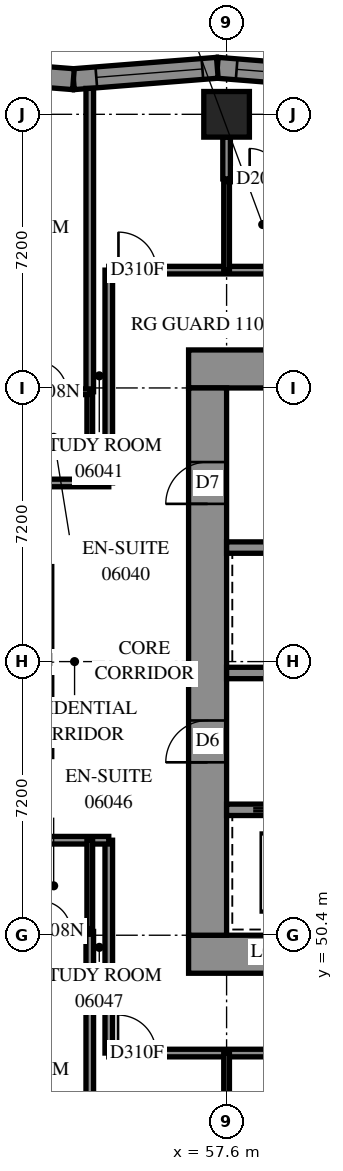
"""IFC4 building model, lengths in metres.
Left out: names, types, materials, properties, quantities, classifications, styles, units other than length and angle.
Written with IfcOpenShell. Run it as: python <this file> out.ifc"""

import sys

from ifc_helpers import new_model, si_unit, direction, frame, frame_2d, origin, origin_2d, place, context, subcontext, project, spatial, polyline, rectangle, outline, extrude, element, fill, save


model = new_model("IFC4")
c1 = context("Model", 3, precision=1e-05, world=origin(), true_north=direction((0.0, 1.0)))
c2 = subcontext(c1, "Body", "Model", "MODEL_VIEW")
j1 = project(units=[si_unit("LENGTHUNIT", "METRE"), si_unit("PLANEANGLEUNIT", "RADIAN")], contexts=[c1])
p1 = place(None, origin())
s1 = spatial("IfcSite", under=j1, at=p1, CompositionType="ELEMENT")
p2 = place(p1, origin())
s2 = spatial("IfcBuilding", under=s1, at=p2, CompositionType="ELEMENT")
p3 = place(p2, frame((0.0, 0.0, 27.0)))
s3 = spatial("IfcBuildingStorey", under=s2, at=p3, CompositionType="ELEMENT", Elevation=27.0)
p4 = place(p3, frame((57.6, 72.0, 0.0), z_axis=(0.0, 0.0, 1.0), x_axis=(1.0, 0.0, 0.0)))
e1 = element("IfcColumn", 1, at=p4, inside=s3, PredefinedType="COLUMN", context=c2, shape_type="SweptSolid", body=[
    extrude(rectangle(XDim=1.2, YDim=1.2, at=origin_2d()), origin(), (0.0, 0.0, 1.0), 3.1),
])
p5 = place(p3, frame((56.6, 49.9, -0.3), z_axis=(0.0, 0.0, 1.0), x_axis=(1.0, 0.0, 0.0)))
e2 = element("IfcWall", 2, at=p5, inside=s3, PredefinedType="SHEAR", context=c2, shape_type="SweptSolid", body=[
    extrude(rectangle(XDim=16.4, YDim=1.0, at=frame_2d((8.2, 0.0))), origin(), (0.0, 0.0, 1.0), 2.7),
])
p6 = place(p3, frame((56.6, 65.3, -0.3), z_axis=(0.0, 0.0, 1.0), x_axis=(1.0, 0.0, 0.0)))
e3 = element("IfcWall", 3, at=p6, inside=s3, PredefinedType="SHEAR", context=c2, shape_type="SweptSolid", body=[
    extrude(rectangle(XDim=16.4, YDim=1.0, at=frame_2d((8.2, 0.0))), origin(), (0.0, 0.0, 1.0), 2.7),
])
p7 = place(p6, frame((11.0, 0.0, 0.3)))
e4 = element("IfcOpeningElement", 4, at=p7, cuts=e3, PredefinedType="OPENING", context=c2, shape_type="SweptSolid", body=[
    extrude(rectangle(XDim=0.8, YDim=2.1, at=frame_2d((0.4, 1.05))), frame((0.0, 0.51, 0.0), z_axis=(0.0, -1.0, 0.0), x_axis=(1.0, 0.0, 0.0)), (0.0, 0.0, 1.0), 1.02),
])
p8 = place(p3, frame((57.1, 50.4, -0.3), z_axis=(0.0, 0.0, 1.0), x_axis=(0.0, 1.0, 0.0)))
e5 = element("IfcWall", 5, at=p8, inside=s3, PredefinedType="SHEAR", context=c2, shape_type="SweptSolid", body=[
    extrude(rectangle(XDim=14.4, YDim=1.0, at=frame_2d((7.2, 0.0))), origin(), (0.0, 0.0, 1.0), 2.7),
])
p9 = place(p8, frame((4.55, 0.0, 0.3)))
e6 = element("IfcOpeningElement", 6, at=p9, cuts=e5, PredefinedType="OPENING", context=c2, shape_type="SweptSolid", body=[
    extrude(rectangle(XDim=1.1, YDim=2.1, at=frame_2d((0.55, 1.05))), frame((0.0, 0.51, 0.0), z_axis=(0.0, -1.0, 0.0), x_axis=(1.0, 0.0, 0.0)), (0.0, 0.0, 1.0), 1.02),
])
p10 = place(p8, frame((11.35, 0.0, 0.3)))
e7 = element("IfcOpeningElement", 7, at=p10, cuts=e5, PredefinedType="OPENING", context=c2, shape_type="SweptSolid", body=[
    extrude(rectangle(XDim=1.1, YDim=2.1, at=frame_2d((0.55, 1.05))), frame((0.0, 0.51, 0.0), z_axis=(0.0, -1.0, 0.0), x_axis=(1.0, 0.0, 0.0)), (0.0, 0.0, 1.0), 1.02),
])
p11 = place(p3, frame((57.6, 53.7, 0.0), z_axis=(0.0, 0.0, 1.0), x_axis=(1.0, 0.0, 0.0)))
e8 = element("IfcWall", 8, at=p11, inside=s3, PredefinedType="SOLIDWALL", context=c2, shape_type="SweptSolid", body=[
    extrude(rectangle(XDim=14.4, YDim=0.3, at=frame_2d((7.2, 0.0))), origin(), (0.0, 0.0, 1.0), 3.1),
])
p12 = place(p11, frame((1.25, 0.0, 0.0)))
e9 = element("IfcOpeningElement", 9, at=p12, cuts=e8, PredefinedType="OPENING", context=c2, shape_type="SweptSolid", body=[
    extrude(rectangle(XDim=1.1, YDim=2.1, at=frame_2d((0.55, 1.05))), frame((0.0, 0.16, 0.0), z_axis=(0.0, -1.0, 0.0), x_axis=(1.0, 0.0, 0.0)), (0.0, 0.0, 1.0), 0.32),
])
p13 = place(p11, frame((4.85, 0.0, 0.0)))
e10 = element("IfcOpeningElement", 10, at=p13, cuts=e8, PredefinedType="OPENING", context=c2, shape_type="SweptSolid", body=[
    extrude(rectangle(XDim=1.1, YDim=2.1, at=frame_2d((0.55, 1.05))), frame((0.0, 0.16, 0.0), z_axis=(0.0, -1.0, 0.0), x_axis=(1.0, 0.0, 0.0)), (0.0, 0.0, 1.0), 0.32),
])
p14 = place(p11, frame((8.45, 0.0, 0.0)))
e11 = element("IfcOpeningElement", 11, at=p14, cuts=e8, PredefinedType="OPENING", context=c2, shape_type="SweptSolid", body=[
    extrude(rectangle(XDim=1.1, YDim=2.1, at=frame_2d((0.55, 1.05))), frame((0.0, 0.16, 0.0), z_axis=(0.0, -1.0, 0.0), x_axis=(1.0, 0.0, 0.0)), (0.0, 0.0, 1.0), 0.32),
])
p15 = place(p11, frame((12.05, 0.0, 0.0)))
e12 = element("IfcOpeningElement", 12, at=p15, cuts=e8, PredefinedType="OPENING", context=c2, shape_type="SweptSolid", body=[
    extrude(rectangle(XDim=1.1, YDim=2.1, at=frame_2d((0.55, 1.05))), frame((0.0, 0.16, 0.0), z_axis=(0.0, -1.0, 0.0), x_axis=(1.0, 0.0, 0.0)), (0.0, 0.0, 1.0), 0.32),
])
p16 = place(p3, frame((57.6, 57.3, 0.0), z_axis=(0.0, 0.0, 1.0), x_axis=(1.0, 0.0, 0.0)))
e13 = element("IfcWall", 13, at=p16, inside=s3, PredefinedType="SOLIDWALL", context=c2, shape_type="SweptSolid", body=[
    extrude(rectangle(XDim=14.4, YDim=0.3, at=frame_2d((7.2, 0.0))), origin(), (0.0, 0.0, 1.0), 3.1),
])
p17 = place(p16, frame((12.05, 0.0, 0.0)))
e14 = element("IfcOpeningElement", 14, at=p17, cuts=e13, PredefinedType="OPENING", context=c2, shape_type="SweptSolid", body=[
    extrude(rectangle(XDim=1.1, YDim=2.1, at=frame_2d((0.55, 1.05))), frame((0.0, 0.16, 0.0), z_axis=(0.0, -1.0, 0.0), x_axis=(1.0, 0.0, 0.0)), (0.0, 0.0, 1.0), 0.32),
])
p18 = place(p3, frame((57.6, 60.6, 0.0), z_axis=(0.0, 0.0, 1.0), x_axis=(1.0, 0.0, 0.0)))
e15 = element("IfcWall", 15, at=p18, inside=s3, PredefinedType="SOLIDWALL", context=c2, shape_type="SweptSolid", body=[
    extrude(rectangle(XDim=7.2, YDim=0.3, at=frame_2d((3.6, 0.0))), origin(), (0.0, 0.0, 1.0), 3.1),
])
p19 = place(p3, frame((61.142, 72.924, 0.0), z_axis=(0.0, 0.0, 1.0), x_axis=(-0.9968746163, 0.078999996, 0.0)))
e16 = element("IfcWall", 16, at=p19, inside=s3, PredefinedType="SOLIDWALL", context=c2, shape_type="SweptSolid", body=[
    extrude(outline(polyline([(0.022, -0.275), (3.819, -0.275), (3.776, 0.275), (-0.022, 0.275), (0.022, -0.275)])), origin(), (0.0, 0.0, 1.0), 3.1),
])
p20 = place(p19, frame((0.488, 0.0, 0.5)))
e17 = element("IfcOpeningElement", 17, at=p20, cuts=e16, PredefinedType="OPENING", context=c2, shape_type="SweptSolid", body=[
    extrude(rectangle(XDim=2.8, YDim=2.45, at=frame_2d((1.4, 1.225))), frame((0.0, 0.285, 0.0), z_axis=(0.0, -1.0, 0.0), x_axis=(1.0, 0.0, 0.0)), (0.0, 0.0, 1.0), 0.57),
])
p21 = place(p3, frame((57.356, 73.224, 0.0), z_axis=(0.0, 0.0, 1.0), x_axis=(-0.9968746163, -0.078999996, 0.0)))
e18 = element("IfcWall", 18, at=p21, inside=s3, PredefinedType="SOLIDWALL", context=c2, shape_type="SweptSolid", body=[
    extrude(outline(polyline([(-0.022, -0.275), (3.776, -0.275), (3.819, 0.275), (0.022, 0.275), (-0.022, -0.275)])), origin(), (0.0, 0.0, 1.0), 3.1),
])
p22 = place(p21, frame((0.394, 0.0, 0.5)))
e19 = element("IfcOpeningElement", 19, at=p22, cuts=e18, PredefinedType="OPENING", context=c2, shape_type="SweptSolid", body=[
    extrude(rectangle(XDim=2.8, YDim=2.45, at=frame_2d((1.4, 1.225))), frame((0.0, 0.285, 0.0), z_axis=(0.0, -1.0, 0.0), x_axis=(1.0, 0.0, 0.0)), (0.0, 0.0, 1.0), 0.57),
])
p23 = place(p3, frame((53.571, 72.924, 0.0), z_axis=(0.0, 0.0, 1.0), x_axis=(-0.9968747806, 0.0789979222, 0.0)))
e20 = element("IfcWall", 20, at=p23, inside=s3, PredefinedType="SOLIDWALL", context=c2, shape_type="SweptSolid", body=[
    extrude(outline(polyline([(0.022, -0.275), (3.819, -0.275), (3.776, 0.275), (-0.022, 0.275), (0.022, -0.275)])), origin(), (0.0, 0.0, 1.0), 3.1),
])
p24 = place(p23, frame((1.09, 0.0, 0.5)))
e21 = element("IfcOpeningElement", 21, at=p24, cuts=e20, PredefinedType="OPENING", context=c2, shape_type="SweptSolid", body=[
    extrude(rectangle(XDim=1.2, YDim=2.45, at=frame_2d((0.6, 1.225))), frame((0.0, 0.285, 0.0), z_axis=(0.0, -1.0, 0.0), x_axis=(1.0, 0.0, 0.0)), (0.0, 0.0, 1.0), 0.57),
])
p25 = place(p3, frame((33.502, 62.3, 0.0), z_axis=(0.0, 0.0, 1.0), x_axis=(1.0, 0.0, 0.0)))
e22 = element("IfcWall", 22, at=p25, inside=s3, PredefinedType="PARTITIONING", context=c2, shape_type="SweptSolid", body=[
    extrude(rectangle(XDim=20.998, YDim=0.2, at=frame_2d((10.499, 0.0))), origin(), (0.0, 0.0, 1.0), 3.1),
])
p26 = place(p25, frame((2.898, 0.0, 0.0)))
e23 = element("IfcOpeningElement", 23, at=p26, cuts=e22, PredefinedType="OPENING", context=c2, shape_type="SweptSolid", body=[
    extrude(rectangle(XDim=0.9, YDim=2.1, at=frame_2d((0.45, 1.05))), frame((0.0, 0.11, 0.0), z_axis=(0.0, -1.0, 0.0), x_axis=(1.0, 0.0, 0.0)), (0.0, 0.0, 1.0), 0.22),
])
p27 = place(p25, frame((8.448, 0.0, 0.0)))
e24 = element("IfcOpeningElement", 24, at=p27, cuts=e22, PredefinedType="OPENING", context=c2, shape_type="SweptSolid", body=[
    extrude(rectangle(XDim=0.9, YDim=2.1, at=frame_2d((0.45, 1.05))), frame((0.0, 0.11, 0.0), z_axis=(0.0, -1.0, 0.0), x_axis=(1.0, 0.0, 0.0)), (0.0, 0.0, 1.0), 0.22),
])
p28 = place(p25, frame((10.098, 0.0, 0.0)))
e25 = element("IfcOpeningElement", 25, at=p28, cuts=e22, PredefinedType="OPENING", context=c2, shape_type="SweptSolid", body=[
    extrude(rectangle(XDim=0.9, YDim=2.1, at=frame_2d((0.45, 1.05))), frame((0.0, 0.11, 0.0), z_axis=(0.0, -1.0, 0.0), x_axis=(1.0, 0.0, 0.0)), (0.0, 0.0, 1.0), 0.22),
])
p29 = place(p25, frame((15.648, 0.0, 0.0)))
e26 = element("IfcOpeningElement", 26, at=p29, cuts=e22, PredefinedType="OPENING", context=c2, shape_type="SweptSolid", body=[
    extrude(rectangle(XDim=0.9, YDim=2.1, at=frame_2d((0.45, 1.05))), frame((0.0, 0.11, 0.0), z_axis=(0.0, -1.0, 0.0), x_axis=(1.0, 0.0, 0.0)), (0.0, 0.0, 1.0), 0.22),
])
p30 = place(p25, frame((17.298, 0.0, 0.0)))
e27 = element("IfcOpeningElement", 27, at=p30, cuts=e22, PredefinedType="OPENING", context=c2, shape_type="SweptSolid", body=[
    extrude(rectangle(XDim=0.9, YDim=2.1, at=frame_2d((0.45, 1.05))), frame((0.0, 0.11, 0.0), z_axis=(0.0, -1.0, 0.0), x_axis=(1.0, 0.0, 0.0)), (0.0, 0.0, 1.0), 0.22),
])
p31 = place(p3, frame((54.5, 67.9, 0.0), z_axis=(0.0, 0.0, 1.0), x_axis=(1.0, 0.0, 0.0)))
e28 = element("IfcWall", 28, at=p31, inside=s3, PredefinedType="PARTITIONING", context=c2, shape_type="SweptSolid", body=[
    extrude(rectangle(XDim=20.6, YDim=0.2, at=frame_2d((10.3, 0.0))), origin(), (0.0, 0.0, 1.0), 3.1),
])
p32 = place(p31, frame((0.255, 0.0, 0.0)))
e29 = element("IfcOpeningElement", 29, at=p32, cuts=e28, PredefinedType="OPENING", context=c2, shape_type="SweptSolid", body=[
    extrude(rectangle(XDim=1.0, YDim=2.1, at=frame_2d((0.5, 1.05))), frame((0.0, 0.11, 0.0), z_axis=(0.0, -1.0, 0.0), x_axis=(1.0, 0.0, 0.0)), (0.0, 0.0, 1.0), 0.22),
])
p33 = place(p31, frame((19.345, 0.0, 0.0)))
e30 = element("IfcOpeningElement", 30, at=p33, cuts=e28, PredefinedType="OPENING", context=c2, shape_type="SweptSolid", body=[
    extrude(rectangle(XDim=1.0, YDim=2.1, at=frame_2d((0.5, 1.05))), frame((0.0, 0.11, 0.0), z_axis=(0.0, -1.0, 0.0), x_axis=(1.0, 0.0, 0.0)), (0.0, 0.0, 1.0), 0.22),
])
p34 = place(p31, frame((5.45, 0.0, 0.0)))
e31 = element("IfcOpeningElement", 31, at=p34, cuts=e28, PredefinedType="OPENING", context=c2, shape_type="SweptSolid", body=[
    extrude(rectangle(XDim=0.9, YDim=2.1, at=frame_2d((0.45, 1.05))), frame((0.0, 0.11, 0.0), z_axis=(0.0, -1.0, 0.0), x_axis=(1.0, 0.0, 0.0)), (0.0, 0.0, 1.0), 0.22),
])
p35 = place(p31, frame((7.1, 0.0, 0.0)))
e32 = element("IfcOpeningElement", 32, at=p35, cuts=e28, PredefinedType="OPENING", context=c2, shape_type="SweptSolid", body=[
    extrude(rectangle(XDim=0.9, YDim=2.1, at=frame_2d((0.45, 1.05))), frame((0.0, 0.11, 0.0), z_axis=(0.0, -1.0, 0.0), x_axis=(1.0, 0.0, 0.0)), (0.0, 0.0, 1.0), 0.22),
])
p36 = place(p31, frame((12.65, 0.0, 0.0)))
e33 = element("IfcOpeningElement", 33, at=p36, cuts=e28, PredefinedType="OPENING", context=c2, shape_type="SweptSolid", body=[
    extrude(rectangle(XDim=0.9, YDim=2.1, at=frame_2d((0.45, 1.05))), frame((0.0, 0.11, 0.0), z_axis=(0.0, -1.0, 0.0), x_axis=(1.0, 0.0, 0.0)), (0.0, 0.0, 1.0), 0.22),
])
p37 = place(p31, frame((14.3, 0.0, 0.0)))
e34 = element("IfcOpeningElement", 34, at=p37, cuts=e28, PredefinedType="OPENING", context=c2, shape_type="SweptSolid", body=[
    extrude(rectangle(XDim=0.9, YDim=2.1, at=frame_2d((0.45, 1.05))), frame((0.0, 0.11, 0.0), z_axis=(0.0, -1.0, 0.0), x_axis=(1.0, 0.0, 0.0)), (0.0, 0.0, 1.0), 0.22),
])
p38 = place(p3, frame((54.5, 47.3, 0.0), z_axis=(0.0, 0.0, 1.0), x_axis=(1.0, 0.0, 0.0)))
e35 = element("IfcWall", 35, at=p38, inside=s3, PredefinedType="PARTITIONING", context=c2, shape_type="SweptSolid", body=[
    extrude(rectangle(XDim=19.56, YDim=0.2, at=frame_2d((9.78, 0.0))), origin(), (0.0, 0.0, 1.0), 3.1),
])
p39 = place(p38, frame((0.243, 0.0, 0.0)))
e36 = element("IfcOpeningElement", 36, at=p39, cuts=e35, PredefinedType="OPENING", context=c2, shape_type="SweptSolid", body=[
    extrude(rectangle(XDim=1.0, YDim=2.1, at=frame_2d((0.5, 1.05))), frame((0.0, 0.11, 0.0), z_axis=(0.0, -1.0, 0.0), x_axis=(1.0, 0.0, 0.0)), (0.0, 0.0, 1.0), 0.22),
])
p40 = place(p38, frame((5.4, 0.0, 0.0)))
e37 = element("IfcOpeningElement", 37, at=p40, cuts=e35, PredefinedType="OPENING", context=c2, shape_type="SweptSolid", body=[
    extrude(rectangle(XDim=0.9, YDim=2.1, at=frame_2d((0.45, 1.05))), frame((0.0, 0.11, 0.0), z_axis=(0.0, -1.0, 0.0), x_axis=(1.0, 0.0, 0.0)), (0.0, 0.0, 1.0), 0.22),
])
p41 = place(p38, frame((7.1, 0.0, 0.0)))
e38 = element("IfcOpeningElement", 38, at=p41, cuts=e35, PredefinedType="OPENING", context=c2, shape_type="SweptSolid", body=[
    extrude(rectangle(XDim=0.9, YDim=2.1, at=frame_2d((0.45, 1.05))), frame((0.0, 0.11, 0.0), z_axis=(0.0, -1.0, 0.0), x_axis=(1.0, 0.0, 0.0)), (0.0, 0.0, 1.0), 0.22),
])
p42 = place(p38, frame((12.6, 0.0, 0.0)))
e39 = element("IfcOpeningElement", 39, at=p42, cuts=e35, PredefinedType="OPENING", context=c2, shape_type="SweptSolid", body=[
    extrude(rectangle(XDim=0.9, YDim=2.1, at=frame_2d((0.45, 1.05))), frame((0.0, 0.11, 0.0), z_axis=(0.0, -1.0, 0.0), x_axis=(1.0, 0.0, 0.0)), (0.0, 0.0, 1.0), 0.22),
])
p43 = place(p38, frame((14.3, 0.0, 0.0)))
e40 = element("IfcOpeningElement", 40, at=p43, cuts=e35, PredefinedType="OPENING", context=c2, shape_type="SweptSolid", body=[
    extrude(rectangle(XDim=0.9, YDim=2.1, at=frame_2d((0.45, 1.05))), frame((0.0, 0.11, 0.0), z_axis=(0.0, -1.0, 0.0), x_axis=(1.0, 0.0, 0.0)), (0.0, 0.0, 1.0), 0.22),
])
p44 = place(p3, frame((54.0, 42.431, 0.0), z_axis=(0.0, 0.0, 1.0), x_axis=(0.0, 1.0, 0.0)))
e41 = element("IfcWall", 41, at=p44, inside=s3, PredefinedType="PARTITIONING", context=c2, shape_type="SweptSolid", body=[
    extrude(rectangle(XDim=8.069, YDim=0.2, at=frame_2d((4.034, 0.0))), origin(), (0.0, 0.0, 1.0), 3.1),
])
p45 = place(p3, frame((54.0, 64.7, 0.0), z_axis=(0.0, 0.0, 1.0), x_axis=(0.0, 1.0, 0.0)))
e42 = element("IfcWall", 42, at=p45, inside=s3, PredefinedType="PARTITIONING", context=c2, shape_type="SweptSolid", body=[
    extrude(rectangle(XDim=7.982, YDim=0.2, at=frame_2d((3.991, 0.0))), origin(), (0.0, 0.0, 1.0), 3.1),
])
p46 = place(p3, frame((54.5, 47.3, 0.0), z_axis=(0.0, 0.0, 1.0), x_axis=(0.0, 1.0, 0.0)))
e43 = element("IfcWall", 43, at=p46, inside=s3, PredefinedType="PARTITIONING", context=c2, shape_type="SweptSolid", body=[
    extrude(rectangle(XDim=5.6, YDim=0.2, at=frame_2d((2.8, 0.0))), origin(), (0.0, 0.0, 1.0), 3.1),
])
p47 = place(p3, frame((54.5, 62.302, 0.0), z_axis=(0.0, 0.0, 1.0), x_axis=(0.0, 1.0, 0.0)))
e44 = element("IfcWall", 44, at=p47, inside=s3, PredefinedType="PARTITIONING", context=c2, shape_type="SweptSolid", body=[
    extrude(rectangle(XDim=5.598, YDim=0.2, at=frame_2d((2.799, 0.0))), origin(), (0.0, 0.0, 1.0), 3.1),
])
p48 = place(p3, frame((50.4, 52.9, 0.0), z_axis=(0.0, 0.0, 1.0), x_axis=(1.0, 0.0, 0.0)))
e45 = element("IfcWall", 45, at=p48, inside=s3, PredefinedType="PARTITIONING", context=c2, shape_type="SweptSolid", body=[
    extrude(rectangle(XDim=4.1, YDim=0.2, at=frame_2d((2.05, 0.0))), origin(), (0.0, 0.0, 1.0), 3.1),
])
p49 = place(p48, frame((0.4, 0.0, 0.0)))
e46 = element("IfcOpeningElement", 46, at=p49, cuts=e45, PredefinedType="OPENING", context=c2, shape_type="SweptSolid", body=[
    extrude(rectangle(XDim=0.9, YDim=2.1, at=frame_2d((0.45, 1.05))), frame((0.0, 0.11, 0.0), z_axis=(0.0, -1.0, 0.0), x_axis=(1.0, 0.0, 0.0)), (0.0, 0.0, 1.0), 0.22),
])
for number, where, z_axis, x_axis in (
    (47, (54.0, 62.3, 0.0), (0.0, 0.0, 1.0), (0.0, 1.0, 0.0)),
    (48, (54.0, 50.5, 0.0), (0.0, 0.0, 1.0), (0.0, 1.0, 0.0)),
    (49, (57.6, 44.9, 0.0), (0.0, 0.0, 1.0), (0.0, 1.0, 0.0)),
    (50, (57.6, 67.9, 0.0), (0.0, 0.0, 1.0), (0.0, 1.0, 0.0)),
):
    element("IfcWall", number, at=place(p3, frame(where, z_axis=z_axis, x_axis=x_axis)), inside=s3, PredefinedType="PARTITIONING", context=c2, shape_type="SweptSolid", body=[
        extrude(rectangle(XDim=2.4, YDim=0.15, at=frame_2d((1.2, 0.0))), origin(), (0.0, 0.0, 1.0), 3.1),
    ])
p50 = place(p3, frame((52.1, 64.7, 0.0), z_axis=(0.0, 0.0, 1.0), x_axis=(1.0, 0.0, 0.0)))
e51 = element("IfcWall", 51, at=p50, inside=s3, PredefinedType="PARTITIONING", context=c2, shape_type="SweptSolid", body=[
    extrude(rectangle(XDim=1.9, YDim=0.15, at=frame_2d((0.95, 0.0))), origin(), (0.0, 0.0, 1.0), 3.1),
])
p51 = place(p50, frame((0.493, 0.0, 0.0)))
e52 = element("IfcOpeningElement", 52, at=p51, cuts=e51, PredefinedType="OPENING", context=c2, shape_type="SweptSolid", body=[
    extrude(rectangle(XDim=0.8, YDim=2.1, at=frame_2d((0.4, 1.05))), frame((0.0, 0.085, 0.0), z_axis=(0.0, -1.0, 0.0), x_axis=(1.0, 0.0, 0.0)), (0.0, 0.0, 1.0), 0.17),
])
p52 = place(p3, frame((52.1, 50.5, 0.0), z_axis=(0.0, 0.0, 1.0), x_axis=(1.0, 0.0, 0.0)))
e53 = element("IfcWall", 53, at=p52, inside=s3, PredefinedType="PARTITIONING", context=c2, shape_type="SweptSolid", body=[
    extrude(rectangle(XDim=1.9, YDim=0.15, at=frame_2d((0.95, 0.0))), origin(), (0.0, 0.0, 1.0), 3.1),
])
p53 = place(p52, frame((0.598, 0.0, 0.0)))
e54 = element("IfcOpeningElement", 54, at=p53, cuts=e53, PredefinedType="OPENING", context=c2, shape_type="SweptSolid", body=[
    extrude(rectangle(XDim=0.8, YDim=2.1, at=frame_2d((0.4, 1.05))), frame((0.0, 0.085, 0.0), z_axis=(0.0, -1.0, 0.0), x_axis=(1.0, 0.0, 0.0)), (0.0, 0.0, 1.0), 0.17),
])
p54 = place(p3, frame((57.6, 70.3, 0.0), z_axis=(0.0, 0.0, 1.0), x_axis=(1.0, 0.0, 0.0)))
e55 = element("IfcWall", 55, at=p54, inside=s3, PredefinedType="PARTITIONING", context=c2, shape_type="SweptSolid", body=[
    extrude(rectangle(XDim=1.9, YDim=0.15, at=frame_2d((0.95, 0.0))), origin(), (0.0, 0.0, 1.0), 3.1),
])
p55 = place(p54, frame((0.607, 0.0, 0.0)))
e56 = element("IfcOpeningElement", 56, at=p55, cuts=e55, PredefinedType="OPENING", context=c2, shape_type="SweptSolid", body=[
    extrude(rectangle(XDim=0.8, YDim=2.1, at=frame_2d((0.4, 1.05))), frame((0.0, 0.085, 0.0), z_axis=(0.0, -1.0, 0.0), x_axis=(1.0, 0.0, 0.0)), (0.0, 0.0, 1.0), 0.17),
])
p56 = place(p3, frame((57.6, 70.3, 0.0), z_axis=(0.0, 0.0, 1.0), x_axis=(0.0, 1.0, 0.0)))
e57 = element("IfcWall", 57, at=p56, inside=s3, PredefinedType="PARTITIONING", context=c2, shape_type="SweptSolid", body=[
    extrude(rectangle(XDim=1.1, YDim=0.2, at=frame_2d((0.55, 0.0))), origin(), (0.0, 0.0, 1.0), 3.1),
])
p57 = place(p20, origin())
e58 = element("IfcWindow", 58, at=p57, inside=s3, PartitioningType="SINGLE_PANEL", PredefinedType="WINDOW", context=c2, shape_type="SweptSolid", body=[
    extrude(rectangle(XDim=2.8, YDim=2.45, at=frame_2d((1.4, 1.225))), frame((0.0, 0.155, 0.0), z_axis=(0.0, -1.0, 0.0), x_axis=(1.0, 0.0, 0.0)), (0.0, 0.0, 1.0), 0.06),
])
fill(e17, e58)
p58 = place(p22, origin())
e59 = element("IfcWindow", 59, at=p58, inside=s3, PartitioningType="SINGLE_PANEL", PredefinedType="WINDOW", context=c2, shape_type="SweptSolid", body=[
    extrude(rectangle(XDim=2.8, YDim=2.45, at=frame_2d((1.4, 1.225))), frame((0.0, 0.155, 0.0), z_axis=(0.0, -1.0, 0.0), x_axis=(1.0, 0.0, 0.0)), (0.0, 0.0, 1.0), 0.06),
])
fill(e19, e59)
p59 = place(p9, origin())
e60 = element("IfcDoor", 60, at=p59, inside=s3, OperationType="DOUBLE_DOOR_SINGLE_SWING", PredefinedType="DOOR", context=c2, shape_type="SweptSolid", body=[
    extrude(rectangle(XDim=1.1, YDim=2.1, at=frame_2d((0.55, 1.05))), frame((0.0, 0.025, 0.0), z_axis=(0.0, -1.0, 0.0), x_axis=(1.0, 0.0, 0.0)), (0.0, 0.0, 1.0), 0.05),
])
fill(e6, e60)
p60 = place(p10, origin())
e61 = element("IfcDoor", 61, at=p60, inside=s3, OperationType="SINGLE_SWING_LEFT", PredefinedType="DOOR", context=c2, shape_type="SweptSolid", body=[
    extrude(rectangle(XDim=1.1, YDim=2.1, at=frame_2d((0.55, 1.05))), frame((0.0, 0.025, 0.0), z_axis=(0.0, -1.0, 0.0), x_axis=(1.0, 0.0, 0.0)), (0.0, 0.0, 1.0), 0.05),
])
fill(e7, e61)
p61 = place(p51, origin())
e62 = element("IfcDoor", 62, at=p61, inside=s3, OperationType="SINGLE_SWING_RIGHT", PredefinedType="DOOR", context=c2, shape_type="SweptSolid", body=[
    extrude(rectangle(XDim=0.8, YDim=2.1, at=frame_2d((0.4, 1.05))), frame((0.0, 0.025, 0.0), z_axis=(0.0, -1.0, 0.0), x_axis=(1.0, 0.0, 0.0)), (0.0, 0.0, 1.0), 0.05),
])
fill(e52, e62)
p62 = place(p32, origin())
e63 = element("IfcDoor", 63, at=p62, inside=s3, OperationType="SINGLE_SWING_LEFT", PredefinedType="DOOR", context=c2, shape_type="SweptSolid", body=[
    extrude(rectangle(XDim=1.0, YDim=2.1, at=frame_2d((0.5, 1.05))), frame((0.0, 0.025, 0.0), z_axis=(0.0, -1.0, 0.0), x_axis=(1.0, 0.0, 0.0)), (0.0, 0.0, 1.0), 0.05),
])
fill(e29, e63)
p63 = place(p53, origin())
e64 = element("IfcDoor", 64, at=p63, inside=s3, OperationType="SINGLE_SWING_RIGHT", PredefinedType="DOOR", context=c2, shape_type="SweptSolid", body=[
    extrude(rectangle(XDim=0.8, YDim=2.1, at=frame_2d((0.4, 1.05))), frame((0.0, 0.025, 0.0), z_axis=(0.0, -1.0, 0.0), x_axis=(1.0, 0.0, 0.0)), (0.0, 0.0, 1.0), 0.05),
])
fill(e54, e64)
p64 = place(p39, origin())
e65 = element("IfcDoor", 65, at=p64, inside=s3, OperationType="SINGLE_SWING_RIGHT", PredefinedType="DOOR", context=c2, shape_type="SweptSolid", body=[
    extrude(rectangle(XDim=1.0, YDim=2.1, at=frame_2d((0.5, 1.05))), frame((0.0, 0.025, 0.0), z_axis=(0.0, -1.0, 0.0), x_axis=(1.0, 0.0, 0.0)), (0.0, 0.0, 1.0), 0.05),
])
fill(e36, e65)
p65 = place(p55, origin())
e66 = element("IfcDoor", 66, at=p65, inside=s3, OperationType="SINGLE_SWING_RIGHT", PredefinedType="DOOR", context=c2, shape_type="SweptSolid", body=[
    extrude(rectangle(XDim=0.8, YDim=2.1, at=frame_2d((0.4, 1.05))), frame((0.0, 0.025, 0.0), z_axis=(0.0, -1.0, 0.0), x_axis=(1.0, 0.0, 0.0)), (0.0, 0.0, 1.0), 0.05),
])
fill(e56, e66)
save(model, sys.argv[1])
